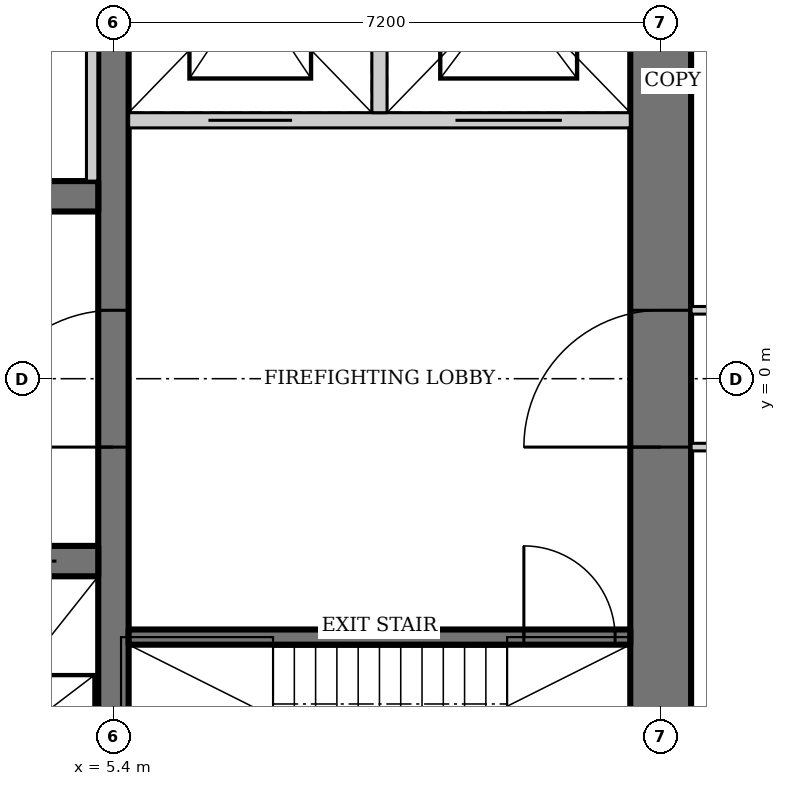
"""IFC4 building model, lengths in metres.
Left out: names, types, materials, properties, quantities, classifications, styles, units other than length and angle.
Written with IfcOpenShell. Run it as: python <this file> out.ifc"""

import sys

from ifc_helpers import new_model, si_unit, direction, frame, frame_2d, origin, place, context, subcontext, project, spatial, rectangle, extrude, element, fill, save


model = new_model("IFC4")
c1 = context("Model", 3, precision=1e-05, world=origin(), true_north=direction((0.0, 1.0)))
c2 = subcontext(c1, "Body", "Model", "MODEL_VIEW")
j1 = project(units=[si_unit("LENGTHUNIT", "METRE"), si_unit("PLANEANGLEUNIT", "RADIAN")], contexts=[c1])
p1 = place(None, origin())
s1 = spatial("IfcSite", under=j1, at=p1, CompositionType="ELEMENT")
p2 = place(p1, origin())
s2 = spatial("IfcBuilding", under=s1, at=p2, CompositionType="ELEMENT")
p3 = place(p2, frame((0.0, 0.0, 203.2)))
s3 = spatial("IfcBuildingStorey", under=s2, at=p3, CompositionType="ELEMENT", Elevation=203.2)
p4 = place(p3, frame((12.6, -13.0, 0.0), z_axis=(0.0, 0.0, 1.0), x_axis=(0.0, 1.0, 0.0)))
e1 = element("IfcWall", 1, at=p4, inside=s3, PredefinedType="SHEAR", context=c2, shape_type="SweptSolid", body=[
    extrude(rectangle(XDim=26.0, YDim=0.8, at=frame_2d((13.0, 0.0))), origin(), (0.0, 0.0, 1.0), 4.2),
])
p5 = place(p4, frame((12.1, 0.0, 0.0)))
e2 = element("IfcOpeningElement", 2, at=p5, cuts=e1, PredefinedType="OPENING", context=c2, shape_type="SweptSolid", body=[
    extrude(rectangle(XDim=1.8, YDim=2.1, at=frame_2d((0.9, 1.05))), frame((0.0, 0.41, 0.0), z_axis=(0.0, -1.0, 0.0), x_axis=(1.0, 0.0, 0.0)), (0.0, 0.0, 1.0), 0.82),
])
p6 = place(p3, frame((5.4, -6.8, 0.0), z_axis=(0.0, 0.0, 1.0), x_axis=(0.0, 1.0, 0.0)))
e3 = element("IfcWall", 3, at=p6, inside=s3, PredefinedType="SHEAR", context=c2, shape_type="SweptSolid", body=[
    extrude(rectangle(XDim=14.6, YDim=0.4, at=frame_2d((7.3, 0.0))), origin(), (0.0, 0.0, 1.0), 4.2),
])
p7 = place(p6, frame((5.9, 0.0, 0.0)))
e4 = element("IfcOpeningElement", 4, at=p7, cuts=e3, PredefinedType="OPENING", context=c2, shape_type="SweptSolid", body=[
    extrude(rectangle(XDim=1.8, YDim=2.1, at=frame_2d((0.9, 1.05))), frame((0.0, 0.21, 0.0), z_axis=(0.0, -1.0, 0.0), x_axis=(1.0, 0.0, 0.0)), (0.0, 0.0, 1.0), 0.42),
])
p8 = place(p3, frame((-5.2, -2.4, 0.0), z_axis=(0.0, 0.0, 1.0), x_axis=(1.0, 0.0, 0.0)))
e5 = element("IfcWall", 5, at=p8, inside=s3, PredefinedType="SHEAR", context=c2, shape_type="SweptSolid", body=[
    extrude(rectangle(XDim=10.4, YDim=0.4, at=frame_2d((5.2, 0.0))), origin(), (0.0, 0.0, 1.0), 4.2),
])
p9 = place(p8, frame((1.683, 0.0, 0.0)))
e6 = element("IfcOpeningElement", 6, at=p9, cuts=e5, PredefinedType="OPENING", context=c2, shape_type="SweptSolid", body=[
    extrude(rectangle(XDim=1.1, YDim=2.2, at=frame_2d((0.55, 1.1))), frame((0.0, 0.21, 0.0), z_axis=(0.0, -1.0, 0.0), x_axis=(1.0, 0.0, 0.0)), (0.0, 0.0, 1.0), 0.42),
])
p10 = place(p8, frame((5.217, 0.0, 0.0)))
e7 = element("IfcOpeningElement", 7, at=p10, cuts=e5, PredefinedType="OPENING", context=c2, shape_type="SweptSolid", body=[
    extrude(rectangle(XDim=1.1, YDim=2.2, at=frame_2d((0.55, 1.1))), frame((0.0, 0.21, 0.0), z_axis=(0.0, -1.0, 0.0), x_axis=(1.0, 0.0, 0.0)), (0.0, 0.0, 1.0), 0.42),
])
p11 = place(p8, frame((8.75, 0.0, 0.0)))
e8 = element("IfcOpeningElement", 8, at=p11, cuts=e5, PredefinedType="OPENING", context=c2, shape_type="SweptSolid", body=[
    extrude(rectangle(XDim=1.1, YDim=2.2, at=frame_2d((0.55, 1.1))), frame((0.0, 0.21, 0.0), z_axis=(0.0, -1.0, 0.0), x_axis=(1.0, 0.0, 0.0)), (0.0, 0.0, 1.0), 0.42),
])
p12 = place(p3, frame((5.2, 2.4, 0.0), z_axis=(0.0, 0.0, 1.0), x_axis=(-1.0, 0.0, 0.0)))
e9 = element("IfcWall", 9, at=p12, inside=s3, PredefinedType="SHEAR", context=c2, shape_type="SweptSolid", body=[
    extrude(rectangle(XDim=10.4, YDim=0.4, at=frame_2d((5.2, 0.0))), origin(), (0.0, 0.0, 1.0), 4.2),
])
p13 = place(p3, frame((5.6, -3.4, 0.0), z_axis=(0.0, 0.0, 1.0), x_axis=(1.0, 0.0, 0.0)))
e10 = element("IfcWall", 10, at=p13, inside=s3, PredefinedType="SHEAR", context=c2, shape_type="SweptSolid", body=[
    extrude(rectangle(XDim=6.6, YDim=0.2, at=frame_2d((3.3, 0.0))), origin(), (0.0, 0.0, 1.0), 4.2),
])
p14 = place(p13, frame((5.2, 0.0, 0.0)))
e11 = element("IfcOpeningElement", 11, at=p14, cuts=e10, PredefinedType="OPENING", context=c2, shape_type="SweptSolid", body=[
    extrude(rectangle(XDim=1.2, YDim=2.1, at=frame_2d((0.6, 1.05))), frame((0.0, 0.11, 0.0), z_axis=(0.0, -1.0, 0.0), x_axis=(1.0, 0.0, 0.0)), (0.0, 0.0, 1.0), 0.22),
])
p15 = place(p3, frame((12.2, 3.4, 0.0), z_axis=(0.0, 0.0, 1.0), x_axis=(-1.0, 0.0, 0.0)))
e12 = element("IfcWall", 12, at=p15, inside=s3, PredefinedType="SOLIDWALL", context=c2, shape_type="SweptSolid", body=[
    extrude(rectangle(XDim=6.6, YDim=0.2, at=frame_2d((3.3, 0.0))), origin(), (0.0, 0.0, 1.0), 4.2),
])
p16 = place(p15, frame((4.45, 0.0, 0.0)))
e13 = element("IfcOpeningElement", 13, at=p16, cuts=e12, PredefinedType="OPENING", context=c2, shape_type="SweptSolid", body=[
    extrude(rectangle(XDim=1.1, YDim=2.2, at=frame_2d((0.55, 1.1))), frame((0.0, 0.11, 0.0), z_axis=(0.0, -1.0, 0.0), x_axis=(1.0, 0.0, 0.0)), (0.0, 0.0, 1.0), 0.22),
])
p17 = place(p15, frame((0.9, 0.0, 0.0)))
e14 = element("IfcOpeningElement", 14, at=p17, cuts=e12, PredefinedType="OPENING", context=c2, shape_type="SweptSolid", body=[
    extrude(rectangle(XDim=1.4, YDim=2.2, at=frame_2d((0.7, 1.1))), frame((0.0, 0.11, 0.0), z_axis=(0.0, -1.0, 0.0), x_axis=(1.0, 0.0, 0.0)), (0.0, 0.0, 1.0), 0.22),
])
p18 = place(p3, frame((8.9, 3.5, 0.0), z_axis=(0.0, 0.0, 1.0), x_axis=(0.0, 1.0, 0.0)))
e15 = element("IfcWall", 15, at=p18, inside=s3, PredefinedType="SOLIDWALL", context=c2, shape_type="SweptSolid", body=[
    extrude(rectangle(XDim=3.3, YDim=0.2, at=frame_2d((1.65, 0.0))), origin(), (0.0, 0.0, 1.0), 4.2),
])
p19 = place(p3, frame((5.12, 2.6, 0.0), z_axis=(0.0, 0.0, 1.0), x_axis=(0.0, 1.0, 0.0)))
e16 = element("IfcWall", 16, at=p19, inside=s3, PredefinedType="SOLIDWALL", context=c2, shape_type="SweptSolid", body=[
    extrude(rectangle(XDim=4.4, YDim=0.15, at=frame_2d((2.2, 0.0))), origin(), (0.0, 0.0, 1.0), 4.05),
])
p20 = place(p3, frame((16.363, -4.08, 0.0), z_axis=(0.0, 0.0, 1.0), x_axis=(-0.730651186567, -0.682750938167, 0.0)))
e17 = element("IfcWall", 17, at=p20, inside=s3, PredefinedType="PARTITIONING", context=c2, shape_type="SweptSolid", body=[
    extrude(rectangle(XDim=4.603, YDim=0.1, at=frame_2d((2.301, 0.0))), origin(), (0.0, 0.0, 1.0), 4.05),
])
p21 = place(p20, frame((1.851, 0.0, 0.0)))
e18 = element("IfcOpeningElement", 18, at=p21, cuts=e17, PredefinedType="OPENING", context=c2, shape_type="SweptSolid", body=[
    extrude(rectangle(XDim=0.9, YDim=2.1, at=frame_2d((0.45, 1.05))), frame((0.0, 0.06, 0.0), z_axis=(0.0, -1.0, 0.0), x_axis=(1.0, 0.0, 0.0)), (0.0, 0.0, 1.0), 0.12),
])
p22 = place(p3, frame((13.0, 7.222, 0.0), z_axis=(0.0, 0.0, 1.0), x_axis=(0.730651186567, -0.682750938167, 0.0)))
e19 = element("IfcWall", 19, at=p22, inside=s3, PredefinedType="PARTITIONING", context=c2, shape_type="SweptSolid", body=[
    extrude(rectangle(XDim=4.603, YDim=0.1, at=frame_2d((2.301, 0.0))), origin(), (0.0, 0.0, 1.0), 4.05),
])
p23 = place(p22, frame((1.851, 0.0, 0.0)))
e20 = element("IfcOpeningElement", 20, at=p23, cuts=e19, PredefinedType="OPENING", context=c2, shape_type="SweptSolid", body=[
    extrude(rectangle(XDim=0.9, YDim=2.1, at=frame_2d((0.45, 1.05))), frame((0.0, 0.06, 0.0), z_axis=(0.0, -1.0, 0.0), x_axis=(1.0, 0.0, 0.0)), (0.0, 0.0, 1.0), 0.12),
])
for number, where, z_axis, x_axis in (
    (21, (13.0, -0.9, 0.0), (0.0, 0.0, 1.0), (1.0, 0.0, 0.0)),
    (22, (15.165, 0.9, 0.0), (0.0, 0.0, 1.0), (-1.0, 0.0, 0.0)),
):
    element("IfcWall", number, at=place(p3, frame(where, z_axis=z_axis, x_axis=x_axis)), inside=s3, PredefinedType="PARTITIONING", context=c2, shape_type="SweptSolid", body=[
        extrude(rectangle(XDim=2.165, YDim=0.1, at=frame_2d((1.083, 0.0))), origin(), (0.0, 0.0, 1.0), 4.05),
    ])
p24 = place(p7, origin())
e23 = element("IfcDoor", 23, at=p24, inside=s3, OperationType="DOUBLE_DOOR_DOUBLE_SWING", PredefinedType="DOOR", context=c2, shape_type="SweptSolid", body=[
    extrude(rectangle(XDim=1.8, YDim=2.1, at=frame_2d((0.9, 1.05))), frame((0.0, 0.025, 0.0), z_axis=(0.0, -1.0, 0.0), x_axis=(1.0, 0.0, 0.0)), (0.0, 0.0, 1.0), 0.05),
])
fill(e4, e23)
p25 = place(p14, origin())
e24 = element("IfcDoor", 24, at=p25, inside=s3, OperationType="SINGLE_SWING_RIGHT", PredefinedType="DOOR", context=c2, shape_type="SweptSolid", body=[
    extrude(rectangle(XDim=1.2, YDim=2.1, at=frame_2d((0.6, 1.05))), frame((0.0, 0.025, 0.0), z_axis=(0.0, -1.0, 0.0), x_axis=(1.0, 0.0, 0.0)), (0.0, 0.0, 1.0), 0.05),
])
fill(e11, e24)
p26 = place(p5, origin())
e25 = element("IfcDoor", 25, at=p26, inside=s3, OperationType="DOUBLE_DOOR_DOUBLE_SWING", PredefinedType="DOOR", context=c2, shape_type="SweptSolid", body=[
    extrude(rectangle(XDim=1.8, YDim=2.1, at=frame_2d((0.9, 1.05))), frame((0.0, 0.025, 0.0), z_axis=(0.0, -1.0, 0.0), x_axis=(1.0, 0.0, 0.0)), (0.0, 0.0, 1.0), 0.05),
])
fill(e2, e25)
p27 = place(p11, origin())
e26 = element("IfcDoor", 26, at=p27, inside=s3, OperationType="DOUBLE_DOOR_SLIDING", PredefinedType="DOOR", context=c2, shape_type="SweptSolid", body=[
    extrude(rectangle(XDim=1.1, YDim=2.2, at=frame_2d((0.55, 1.1))), frame((0.0, 0.025, 0.0), z_axis=(0.0, -1.0, 0.0), x_axis=(1.0, 0.0, 0.0)), (0.0, 0.0, 1.0), 0.05),
])
fill(e8, e26)
p28 = place(p16, origin())
e27 = element("IfcDoor", 27, at=p28, inside=s3, OperationType="DOUBLE_DOOR_SLIDING", PredefinedType="DOOR", context=c2, shape_type="SweptSolid", body=[
    extrude(rectangle(XDim=1.1, YDim=2.2, at=frame_2d((0.55, 1.1))), frame((0.0, 0.025, 0.0), z_axis=(0.0, -1.0, 0.0), x_axis=(1.0, 0.0, 0.0)), (0.0, 0.0, 1.0), 0.05),
])
fill(e13, e27)
p29 = place(p17, origin())
e28 = element("IfcDoor", 28, at=p29, inside=s3, OperationType="DOUBLE_DOOR_SLIDING", PredefinedType="DOOR", context=c2, shape_type="SweptSolid", body=[
    extrude(rectangle(XDim=1.4, YDim=2.2, at=frame_2d((0.7, 1.1))), frame((0.0, 0.025, 0.0), z_axis=(0.0, -1.0, 0.0), x_axis=(1.0, 0.0, 0.0)), (0.0, 0.0, 1.0), 0.05),
])
fill(e14, e28)
save(model, sys.argv[1])
